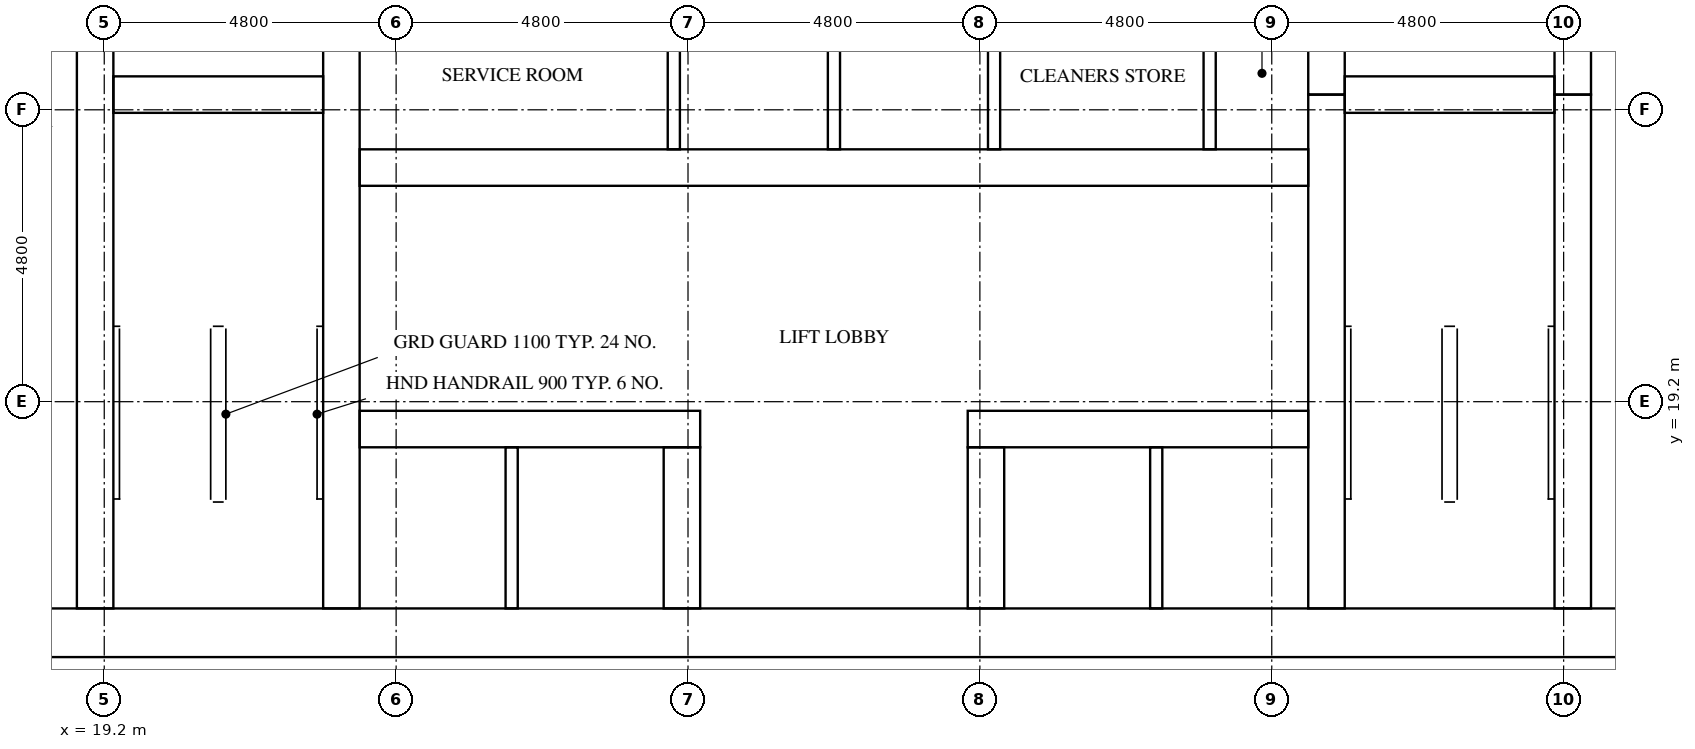
"""IFC4 building model, lengths in metres.
Left out: names, types, materials, properties, quantities, classifications, styles, units other than length and angle.
Written with IfcOpenShell. Run it as: python <this file> out.ifc"""

import sys

from ifc_helpers import new_model, si_unit, direction, frame, frame_2d, origin, place, context, subcontext, project, spatial, rectangle, extrude, element, fill, save


model = new_model("IFC4")
c1 = context("Model", 3, precision=1e-05, world=origin(), true_north=direction((0.0, 1.0)))
c2 = subcontext(c1, "Body", "Model", "MODEL_VIEW")
j1 = project(units=[si_unit("LENGTHUNIT", "METRE"), si_unit("PLANEANGLEUNIT", "RADIAN")], contexts=[c1])
p1 = place(None, origin())
s1 = spatial("IfcSite", under=j1, at=p1, CompositionType="ELEMENT")
p2 = place(p1, origin())
s2 = spatial("IfcBuilding", under=s1, at=p2, CompositionType="ELEMENT")
p3 = place(p2, frame((0.0, 0.0, 126.1)))
s3 = spatial("IfcBuildingStorey", under=s2, at=p3, CompositionType="ELEMENT", Elevation=126.1)
p4 = place(p3, frame((15.0, 15.4, 0.0), z_axis=(0.0, 0.0, 1.0), x_axis=(1.0, 0.0, 0.0)))
e1 = element("IfcWall", 1, at=p4, inside=s3, PredefinedType="SHEAR", context=c2, shape_type="SweptSolid", body=[
    extrude(rectangle(XDim=32.4, YDim=0.8, at=frame_2d((16.2, 0.0))), origin(), (0.0, 0.0, 1.0), 3.2),
])
p5 = place(p4, frame((15.3, 0.0, 0.0)))
e2 = element("IfcOpeningElement", 2, at=p5, cuts=e1, PredefinedType="OPENING", context=c2, shape_type="SweptSolid", body=[
    extrude(rectangle(XDim=1.8, YDim=2.1, at=frame_2d((0.9, 1.05))), frame((0.0, 0.41, 0.0), z_axis=(0.0, -1.0, 0.0), x_axis=(1.0, 0.0, 0.0)), (0.0, 0.0, 1.0), 0.82),
])
p6 = place(p3, frame((19.05, 15.8, 0.0), z_axis=(0.0, 0.0, 1.0), x_axis=(0.0, 1.0, 0.0)))
e3 = element("IfcWall", 3, at=p6, inside=s3, PredefinedType="SHEAR", context=c2, shape_type="SweptSolid", body=[
    extrude(rectangle(XDim=15.15, YDim=0.6, at=frame_2d((7.575, 0.0))), origin(), (0.0, 0.0, 1.0), 3.2),
])
p7 = place(p6, frame((9.65, 0.0, 0.0)))
e4 = element("IfcOpeningElement", 4, at=p7, cuts=e3, PredefinedType="OPENING", context=c2, shape_type="SweptSolid", body=[
    extrude(rectangle(XDim=1.1, YDim=2.1, at=frame_2d((0.55, 1.05))), frame((0.0, 0.31, 0.0), z_axis=(0.0, -1.0, 0.0), x_axis=(1.0, 0.0, 0.0)), (0.0, 0.0, 1.0), 0.62),
])
p8 = place(p6, frame((13.15, 0.0, 0.0)))
e5 = element("IfcOpeningElement", 5, at=p8, cuts=e3, PredefinedType="OPENING", context=c2, shape_type="SweptSolid", body=[
    extrude(rectangle(XDim=1.1, YDim=2.1, at=frame_2d((0.55, 1.05))), frame((0.0, 0.31, 0.0), z_axis=(0.0, -1.0, 0.0), x_axis=(1.0, 0.0, 0.0)), (0.0, 0.0, 1.0), 0.62),
])
p9 = place(p6, frame((0.4, 0.0, 0.0)))
e6 = element("IfcOpeningElement", 6, at=p9, cuts=e3, PredefinedType="OPENING", context=c2, shape_type="SweptSolid", body=[
    extrude(rectangle(XDim=1.2, YDim=2.1, at=frame_2d((0.6, 1.05))), frame((0.0, 0.31, 0.0), z_axis=(0.0, -1.0, 0.0), x_axis=(1.0, 0.0, 0.0)), (0.0, 0.0, 1.0), 0.62),
])
p10 = place(p3, frame((23.1, 15.8, 0.0), z_axis=(0.0, 0.0, 1.0), x_axis=(0.0, 1.0, 0.0)))
e7 = element("IfcWall", 7, at=p10, inside=s3, PredefinedType="SHEAR", context=c2, shape_type="SweptSolid", body=[
    extrude(rectangle(XDim=21.2, YDim=0.6, at=frame_2d((10.6, 0.0))), origin(), (0.0, 0.0, 1.0), 3.2),
])
p11 = place(p3, frame((39.3, 15.8, 0.0), z_axis=(0.0, 0.0, 1.0), x_axis=(0.0, 1.0, 0.0)))
e8 = element("IfcWall", 8, at=p11, inside=s3, PredefinedType="SHEAR", context=c2, shape_type="SweptSolid", body=[
    extrude(rectangle(XDim=8.45, YDim=0.6, at=frame_2d((4.225, 0.0))), origin(), (0.0, 0.0, 1.0), 3.2),
])
p12 = place(p3, frame((39.3, 24.25, 0.0), z_axis=(0.0, 0.0, 1.0), x_axis=(0.0, 1.0, 0.0)))
e9 = element("IfcWall", 9, at=p12, inside=s3, PredefinedType="SHEAR", context=c2, shape_type="SweptSolid", body=[
    extrude(rectangle(XDim=3.5, YDim=0.6, at=frame_2d((1.75, 0.0))), origin(), (0.0, 0.0, 1.0), 3.2),
])
p13 = place(p3, frame((43.35, 15.8, 0.0), z_axis=(0.0, 0.0, 1.0), x_axis=(0.0, 1.0, 0.0)))
e10 = element("IfcWall", 10, at=p13, inside=s3, PredefinedType="SHEAR", context=c2, shape_type="SweptSolid", body=[
    extrude(rectangle(XDim=8.45, YDim=0.6, at=frame_2d((4.225, 0.0))), origin(), (0.0, 0.0, 1.0), 3.2),
])
p14 = place(p13, frame((0.4, 0.0, 0.0)))
e11 = element("IfcOpeningElement", 11, at=p14, cuts=e10, PredefinedType="OPENING", context=c2, shape_type="SweptSolid", body=[
    extrude(rectangle(XDim=1.2, YDim=2.1, at=frame_2d((0.6, 1.05))), frame((0.0, 0.31, 0.0), z_axis=(0.0, -1.0, 0.0), x_axis=(1.0, 0.0, 0.0)), (0.0, 0.0, 1.0), 0.62),
])
p15 = place(p3, frame((43.35, 24.25, 0.0), z_axis=(0.0, 0.0, 1.0), x_axis=(0.0, 1.0, 0.0)))
e12 = element("IfcWall", 12, at=p15, inside=s3, PredefinedType="SHEAR", context=c2, shape_type="SweptSolid", body=[
    extrude(rectangle(XDim=3.5, YDim=0.6, at=frame_2d((1.75, 0.0))), origin(), (0.0, 0.0, 1.0), 3.2),
])
p16 = place(p15, frame((1.2, 0.0, 0.0)))
e13 = element("IfcOpeningElement", 13, at=p16, cuts=e12, PredefinedType="OPENING", context=c2, shape_type="SweptSolid", body=[
    extrude(rectangle(XDim=1.1, YDim=2.1, at=frame_2d((0.55, 1.05))), frame((0.0, 0.31, 0.0), z_axis=(0.0, -1.0, 0.0), x_axis=(1.0, 0.0, 0.0)), (0.0, 0.0, 1.0), 0.62),
])
for number, where, z_axis, x_axis in (
    (14, (19.35, 24.25, 0.0), (0.0, 0.0, 1.0), (1.0, 0.0, 0.0)),
    (15, (39.6, 24.25, 0.0), (0.0, 0.0, 1.0), (1.0, 0.0, 0.0)),
):
    element("IfcWall", number, at=place(p3, frame(where, z_axis=z_axis, x_axis=x_axis)), inside=s3, PredefinedType="SHEAR", context=c2, shape_type="SweptSolid", body=[
        extrude(rectangle(XDim=3.45, YDim=0.6, at=frame_2d((1.725, 0.0))), origin(), (0.0, 0.0, 1.0), 3.2),
    ])
p17 = place(p3, frame((23.4, 18.75, 0.0), z_axis=(0.0, 0.0, 1.0), x_axis=(1.0, 0.0, 0.0)))
e16 = element("IfcWall", 16, at=p17, inside=s3, PredefinedType="SHEAR", context=c2, shape_type="SweptSolid", body=[
    extrude(rectangle(XDim=5.6, YDim=0.6, at=frame_2d((2.8, 0.0))), origin(), (0.0, 0.0, 1.0), 3.2),
])
p18 = place(p17, frame((0.65, 0.0, 0.0)))
e17 = element("IfcOpeningElement", 17, at=p18, cuts=e16, PredefinedType="OPENING", context=c2, shape_type="SweptSolid", body=[
    extrude(rectangle(XDim=1.1, YDim=2.1, at=frame_2d((0.55, 1.05))), frame((0.0, 0.31, 0.0), z_axis=(0.0, -1.0, 0.0), x_axis=(1.0, 0.0, 0.0)), (0.0, 0.0, 1.0), 0.62),
])
p19 = place(p17, frame((3.25, 0.0, 0.0)))
e18 = element("IfcOpeningElement", 18, at=p19, cuts=e16, PredefinedType="OPENING", context=c2, shape_type="SweptSolid", body=[
    extrude(rectangle(XDim=1.1, YDim=2.1, at=frame_2d((0.55, 1.05))), frame((0.0, 0.31, 0.0), z_axis=(0.0, -1.0, 0.0), x_axis=(1.0, 0.0, 0.0)), (0.0, 0.0, 1.0), 0.62),
])
p20 = place(p3, frame((33.4, 18.75, 0.0), z_axis=(0.0, 0.0, 1.0), x_axis=(1.0, 0.0, 0.0)))
e19 = element("IfcWall", 19, at=p20, inside=s3, PredefinedType="SHEAR", context=c2, shape_type="SweptSolid", body=[
    extrude(rectangle(XDim=5.6, YDim=0.6, at=frame_2d((2.8, 0.0))), origin(), (0.0, 0.0, 1.0), 3.2),
])
p21 = place(p20, frame((1.25, 0.0, 0.0)))
e20 = element("IfcOpeningElement", 20, at=p21, cuts=e19, PredefinedType="OPENING", context=c2, shape_type="SweptSolid", body=[
    extrude(rectangle(XDim=1.1, YDim=2.1, at=frame_2d((0.55, 1.05))), frame((0.0, 0.31, 0.0), z_axis=(0.0, -1.0, 0.0), x_axis=(1.0, 0.0, 0.0)), (0.0, 0.0, 1.0), 0.62),
])
p22 = place(p20, frame((3.85, 0.0, 0.0)))
e21 = element("IfcOpeningElement", 21, at=p22, cuts=e19, PredefinedType="OPENING", context=c2, shape_type="SweptSolid", body=[
    extrude(rectangle(XDim=1.1, YDim=2.1, at=frame_2d((0.55, 1.05))), frame((0.0, 0.31, 0.0), z_axis=(0.0, -1.0, 0.0), x_axis=(1.0, 0.0, 0.0)), (0.0, 0.0, 1.0), 0.62),
])
p23 = place(p3, frame((23.4, 23.05, 0.0), z_axis=(0.0, 0.0, 1.0), x_axis=(1.0, 0.0, 0.0)))
e22 = element("IfcWall", 22, at=p23, inside=s3, PredefinedType="SHEAR", context=c2, shape_type="SweptSolid", body=[
    extrude(rectangle(XDim=15.6, YDim=0.6, at=frame_2d((7.8, 0.0))), origin(), (0.0, 0.0, 1.0), 3.2),
])
p24 = place(p23, frame((2.033, 0.0, 0.0)))
e23 = element("IfcOpeningElement", 23, at=p24, cuts=e22, PredefinedType="OPENING", context=c2, shape_type="SweptSolid", body=[
    extrude(rectangle(XDim=1.0, YDim=2.1, at=frame_2d((0.5, 1.05))), frame((0.0, 0.31, 0.0), z_axis=(0.0, -1.0, 0.0), x_axis=(1.0, 0.0, 0.0)), (0.0, 0.0, 1.0), 0.62),
])
p25 = place(p23, frame((11.706, 0.0, 0.0)))
e24 = element("IfcOpeningElement", 24, at=p25, cuts=e22, PredefinedType="OPENING", context=c2, shape_type="SweptSolid", body=[
    extrude(rectangle(XDim=1.0, YDim=2.1, at=frame_2d((0.5, 1.05))), frame((0.0, 0.31, 0.0), z_axis=(0.0, -1.0, 0.0), x_axis=(1.0, 0.0, 0.0)), (0.0, 0.0, 1.0), 0.62),
])
p26 = place(p23, frame((14.339, 0.0, 0.0)))
e25 = element("IfcOpeningElement", 25, at=p26, cuts=e22, PredefinedType="OPENING", context=c2, shape_type="SweptSolid", body=[
    extrude(rectangle(XDim=1.0, YDim=2.1, at=frame_2d((0.5, 1.05))), frame((0.0, 0.31, 0.0), z_axis=(0.0, -1.0, 0.0), x_axis=(1.0, 0.0, 0.0)), (0.0, 0.0, 1.0), 0.62),
])
for number, where, z_axis, x_axis in (
    (26, (28.7, 15.8, 0.0), (0.0, 0.0, 1.0), (0.0, 1.0, 0.0)),
    (27, (33.7, 15.8, 0.0), (0.0, 0.0, 1.0), (0.0, 1.0, 0.0)),
):
    element("IfcWall", number, at=place(p3, frame(where, z_axis=z_axis, x_axis=x_axis)), inside=s3, PredefinedType="SHEAR", context=c2, shape_type="SweptSolid", body=[
        extrude(rectangle(XDim=2.65, YDim=0.6, at=frame_2d((1.325, 0.0))), origin(), (0.0, 0.0, 1.0), 3.2),
    ])
for number, where, z_axis, x_axis in (
    (28, (28.567, 23.35, 0.0), (0.0, 0.0, 1.0), (0.0, 1.0, 0.0)),
    (29, (31.2, 23.35, 0.0), (0.0, 0.0, 1.0), (0.0, 1.0, 0.0)),
    (30, (33.833, 23.35, 0.0), (0.0, 0.0, 1.0), (0.0, 1.0, 0.0)),
):
    element("IfcWall", number, at=place(p3, frame(where, z_axis=z_axis, x_axis=x_axis)), inside=s3, PredefinedType="SOLIDWALL", context=c2, shape_type="SweptSolid", body=[
        extrude(rectangle(XDim=2.5, YDim=0.2, at=frame_2d((1.25, 0.0))), origin(), (0.0, 0.0, 1.0), 3.2),
    ])
for number, where, z_axis, x_axis in (
    (31, (25.9, 15.8, 0.0), (0.0, 0.0, 1.0), (0.0, 1.0, 0.0)),
    (32, (36.5, 15.8, 0.0), (0.0, 0.0, 1.0), (0.0, 1.0, 0.0)),
):
    element("IfcWall", number, at=place(p3, frame(where, z_axis=z_axis, x_axis=x_axis)), inside=s3, PredefinedType="SOLIDWALL", context=c2, shape_type="SweptSolid", body=[
        extrude(rectangle(XDim=2.65, YDim=0.2, at=frame_2d((1.325, 0.0))), origin(), (0.0, 0.0, 1.0), 3.2),
    ])
p27 = place(p3, frame((37.379, 23.35, 0.0), z_axis=(0.0, 0.0, 1.0), x_axis=(0.0, 1.0, 0.0)))
e33 = element("IfcWall", 33, at=p27, inside=s3, PredefinedType="PARTITIONING", context=c2, shape_type="SweptSolid", body=[
    extrude(rectangle(XDim=2.5, YDim=0.2, at=frame_2d((1.25, 0.0))), origin(), (0.0, 0.0, 1.0), 3.2),
])
p28 = place(p18, origin())
e34 = element("IfcDoor", 34, at=p28, inside=s3, OperationType="DOUBLE_DOOR_SLIDING", PredefinedType="DOOR", context=c2, shape_type="SweptSolid", body=[
    extrude(rectangle(XDim=1.1, YDim=2.1, at=frame_2d((0.55, 1.05))), frame((0.0, 0.025, 0.0), z_axis=(0.0, -1.0, 0.0), x_axis=(1.0, 0.0, 0.0)), (0.0, 0.0, 1.0), 0.05),
])
fill(e17, e34)
p29 = place(p19, origin())
e35 = element("IfcDoor", 35, at=p29, inside=s3, OperationType="DOUBLE_DOOR_SLIDING", PredefinedType="DOOR", context=c2, shape_type="SweptSolid", body=[
    extrude(rectangle(XDim=1.1, YDim=2.1, at=frame_2d((0.55, 1.05))), frame((0.0, 0.025, 0.0), z_axis=(0.0, -1.0, 0.0), x_axis=(1.0, 0.0, 0.0)), (0.0, 0.0, 1.0), 0.05),
])
fill(e18, e35)
p30 = place(p21, origin())
e36 = element("IfcDoor", 36, at=p30, inside=s3, OperationType="DOUBLE_DOOR_SLIDING", PredefinedType="DOOR", context=c2, shape_type="SweptSolid", body=[
    extrude(rectangle(XDim=1.1, YDim=2.1, at=frame_2d((0.55, 1.05))), frame((0.0, 0.025, 0.0), z_axis=(0.0, -1.0, 0.0), x_axis=(1.0, 0.0, 0.0)), (0.0, 0.0, 1.0), 0.05),
])
fill(e20, e36)
p31 = place(p22, origin())
e37 = element("IfcDoor", 37, at=p31, inside=s3, OperationType="DOUBLE_DOOR_SLIDING", PredefinedType="DOOR", context=c2, shape_type="SweptSolid", body=[
    extrude(rectangle(XDim=1.1, YDim=2.1, at=frame_2d((0.55, 1.05))), frame((0.0, 0.025, 0.0), z_axis=(0.0, -1.0, 0.0), x_axis=(1.0, 0.0, 0.0)), (0.0, 0.0, 1.0), 0.05),
])
fill(e21, e37)
p32 = place(p9, frame((1.2, 0.0, 0.0), z_axis=(0.0, 0.0, 1.0), x_axis=(-1.0, 0.0, 0.0)))
e38 = element("IfcDoor", 38, at=p32, inside=s3, OperationType="SINGLE_SWING_RIGHT", PredefinedType="DOOR", context=c2, shape_type="SweptSolid", body=[
    extrude(rectangle(XDim=1.2, YDim=2.1, at=frame_2d((0.6, 1.05))), frame((0.0, 0.025, 0.0), z_axis=(0.0, -1.0, 0.0), x_axis=(1.0, 0.0, 0.0)), (0.0, 0.0, 1.0), 0.05),
])
fill(e6, e38)
p33 = place(p14, origin())
e39 = element("IfcDoor", 39, at=p33, inside=s3, OperationType="SINGLE_SWING_LEFT", PredefinedType="DOOR", context=c2, shape_type="SweptSolid", body=[
    extrude(rectangle(XDim=1.2, YDim=2.1, at=frame_2d((0.6, 1.05))), frame((0.0, 0.025, 0.0), z_axis=(0.0, -1.0, 0.0), x_axis=(1.0, 0.0, 0.0)), (0.0, 0.0, 1.0), 0.05),
])
fill(e11, e39)
p34 = place(p5, frame((1.8, 0.0, 0.0), z_axis=(0.0, 0.0, 1.0), x_axis=(-1.0, 0.0, 0.0)))
e40 = element("IfcDoor", 40, at=p34, inside=s3, OperationType="DOUBLE_DOOR_SINGLE_SWING", PredefinedType="DOOR", context=c2, shape_type="SweptSolid", body=[
    extrude(rectangle(XDim=1.8, YDim=2.1, at=frame_2d((0.9, 1.05))), frame((0.0, 0.025, 0.0), z_axis=(0.0, -1.0, 0.0), x_axis=(1.0, 0.0, 0.0)), (0.0, 0.0, 1.0), 0.05),
])
fill(e2, e40)
p35 = place(p24, frame((1.0, 0.0, 0.0), z_axis=(0.0, 0.0, 1.0), x_axis=(-1.0, 0.0, 0.0)))
e41 = element("IfcDoor", 41, at=p35, inside=s3, OperationType="SINGLE_SWING_LEFT", PredefinedType="DOOR", context=c2, shape_type="SweptSolid", body=[
    extrude(rectangle(XDim=1.0, YDim=2.1, at=frame_2d((0.5, 1.05))), frame((0.0, 0.025, 0.0), z_axis=(0.0, -1.0, 0.0), x_axis=(1.0, 0.0, 0.0)), (0.0, 0.0, 1.0), 0.05),
])
fill(e23, e41)
p36 = place(p25, frame((1.0, 0.0, 0.0), z_axis=(0.0, 0.0, 1.0), x_axis=(-1.0, 0.0, 0.0)))
e42 = element("IfcDoor", 42, at=p36, inside=s3, OperationType="SINGLE_SWING_RIGHT", PredefinedType="DOOR", context=c2, shape_type="SweptSolid", body=[
    extrude(rectangle(XDim=1.0, YDim=2.1, at=frame_2d((0.5, 1.05))), frame((0.0, 0.025, 0.0), z_axis=(0.0, -1.0, 0.0), x_axis=(1.0, 0.0, 0.0)), (0.0, 0.0, 1.0), 0.05),
])
fill(e24, e42)
p37 = place(p26, frame((1.0, 0.0, 0.0), z_axis=(0.0, 0.0, 1.0), x_axis=(-1.0, 0.0, 0.0)))
e43 = element("IfcDoor", 43, at=p37, inside=s3, OperationType="SINGLE_SWING_LEFT", PredefinedType="DOOR", context=c2, shape_type="SweptSolid", body=[
    extrude(rectangle(XDim=1.0, YDim=2.1, at=frame_2d((0.5, 1.05))), frame((0.0, 0.025, 0.0), z_axis=(0.0, -1.0, 0.0), x_axis=(1.0, 0.0, 0.0)), (0.0, 0.0, 1.0), 0.05),
])
fill(e25, e43)
save(model, sys.argv[1])
